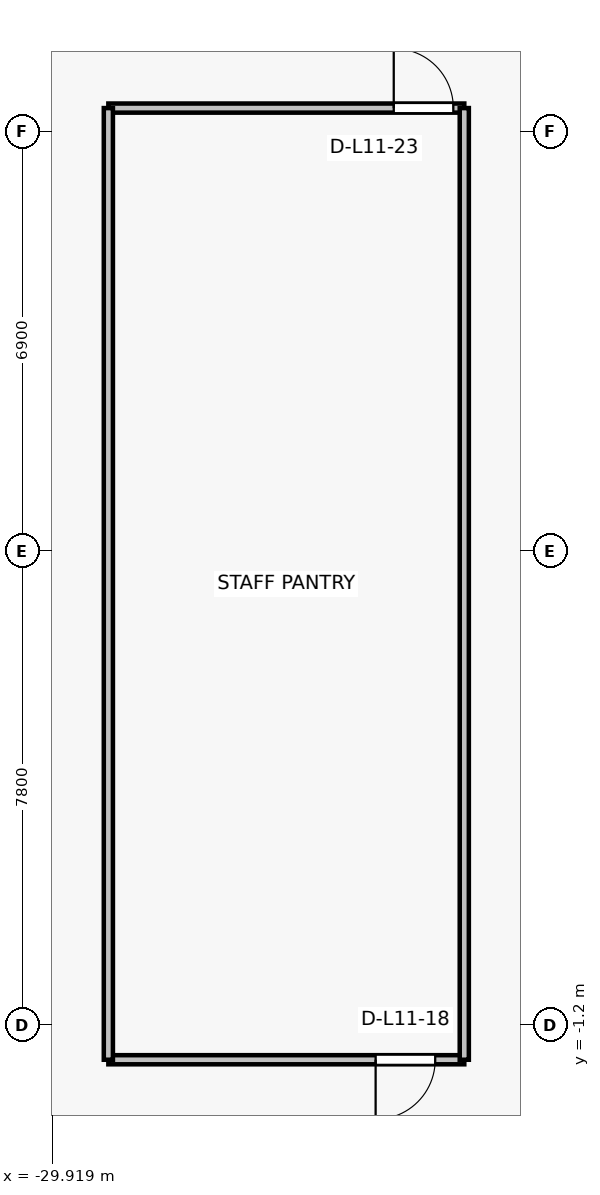
"""IFC4 building model, lengths in metres.
Left out: names, types, materials, properties, quantities, classifications, styles, units other than length and angle.
Written with IfcOpenShell. Run it as: python <this file> out.ifc"""

import sys

from ifc_helpers import new_model, si_unit, direction, frame, frame_2d, origin, place, context, subcontext, project, spatial, rectangle, extrude, source, transform, mapped, element, fill, save


model = new_model("IFC4")
c1 = context("Model", 3, precision=1e-05, world=origin(), true_north=direction((0.0, 1.0)))
c2 = subcontext(c1, "Body", "Model", "MODEL_VIEW")
j1 = project(units=[si_unit("LENGTHUNIT", "METRE"), si_unit("PLANEANGLEUNIT", "RADIAN")], contexts=[c1])
p1 = place(None, origin())
s1 = spatial("IfcSite", under=j1, at=p1, CompositionType="ELEMENT")
p2 = place(p1, origin())
s2 = spatial("IfcBuilding", under=s1, at=p2, CompositionType="ELEMENT")
p3 = place(p2, frame((0.0, 0.0, 43.9)))
s3 = spatial("IfcBuildingStorey", under=s2, at=p3, CompositionType="ELEMENT", Elevation=43.9)
p4 = place(p3, frame((-23.143, -1.77, 0.0), z_axis=(0.0, 0.0, 1.0), x_axis=(-1.0, 0.0, 0.0)))
e1 = element("IfcWall", 1, at=p4, inside=s3, PredefinedType="PARTITIONING", context=c2, shape_type="SweptSolid", body=[
    extrude(rectangle(XDim=5.853, YDim=0.15, at=frame_2d((2.927, 0.0))), origin(), (0.0, 0.0, 1.0), 3.075),
])
p5 = place(p4, frame((0.478, 0.0, 0.0)))
e2 = element("IfcOpeningElement", 2, at=p5, cuts=e1, PredefinedType="OPENING", context=c2, shape_type="SweptSolid", body=[
    extrude(rectangle(XDim=0.98, YDim=2.15, at=frame_2d((0.49, 1.075))), frame((0.0, 0.085, 0.0), z_axis=(0.0, -1.0, 0.0), x_axis=(1.0, 0.0, 0.0)), (0.0, 0.0, 1.0), 0.17),
])
p6 = place(p3, frame((-28.996, 13.88, 0.0), z_axis=(0.0, 0.0, 1.0), x_axis=(1.0, 0.0, 0.0)))
e3 = element("IfcWall", 3, at=p6, inside=s3, PredefinedType="PARTITIONING", context=c2, shape_type="SweptSolid", body=[
    extrude(rectangle(XDim=5.853, YDim=0.15, at=frame_2d((2.927, 0.0))), origin(), (0.0, 0.0, 1.0), 3.075),
])
p7 = place(p6, frame((4.693, 0.0, 0.0)))
e4 = element("IfcOpeningElement", 4, at=p7, cuts=e3, PredefinedType="OPENING", context=c2, shape_type="SweptSolid", body=[
    extrude(rectangle(XDim=0.98, YDim=2.15, at=frame_2d((0.49, 1.075))), frame((0.0, 0.085, 0.0), z_axis=(0.0, -1.0, 0.0), x_axis=(1.0, 0.0, 0.0)), (0.0, 0.0, 1.0), 0.17),
])
for number, where, z_axis, x_axis in (
    (5, (-28.996, -1.77, 0.0), (0.0, 0.0, 1.0), (0.0, 1.0, 0.0)),
    (6, (-23.143, 13.88, 0.0), (0.0, 0.0, 1.0), (0.0, -1.0, 0.0)),
):
    element("IfcWall", number, at=place(p3, frame(where, z_axis=z_axis, x_axis=x_axis)), inside=s3, PredefinedType="PARTITIONING", context=c2, shape_type="SweptSolid", body=[
        extrude(rectangle(XDim=15.65, YDim=0.15, at=frame_2d((7.825, 0.0))), origin(), (0.0, 0.0, 1.0), 2.465),
    ])
m1 = source(origin(), c2, "Body", "SweptSolid", [
    extrude(rectangle(XDim=0.98, YDim=2.15, at=frame_2d((0.49, 1.075))), frame((0.0, 0.025, 0.0), z_axis=(0.0, -1.0, 0.0), x_axis=(1.0, 0.0, 0.0)), (0.0, 0.0, 1.0), 0.05),
])
p8 = place(p5, origin())
e7 = element("IfcDoor", 7, at=p8, inside=s3, OperationType="SINGLE_SWING_RIGHT", PredefinedType="DOOR", context=c2, shape_type="MappedRepresentation", body=[
    mapped(m1, transform((0.0, 0.0, 0.0), x_axis=(1.0, 0.0, 0.0), y_axis=(0.0, 1.0, 0.0), z_axis=(0.0, 0.0, 1.0), scale=1.0)),
])
fill(e2, e7)
p9 = place(p7, origin())
e8 = element("IfcDoor", 8, at=p9, inside=s3, OperationType="SINGLE_SWING_LEFT", PredefinedType="DOOR", context=c2, shape_type="MappedRepresentation", body=[
    mapped(m1, transform((0.0, 0.0, 0.0), x_axis=(1.0, 0.0, 0.0), y_axis=(0.0, 1.0, 0.0), z_axis=(0.0, 0.0, 1.0), scale=1.0)),
])
fill(e4, e8)
save(model, sys.argv[1])
